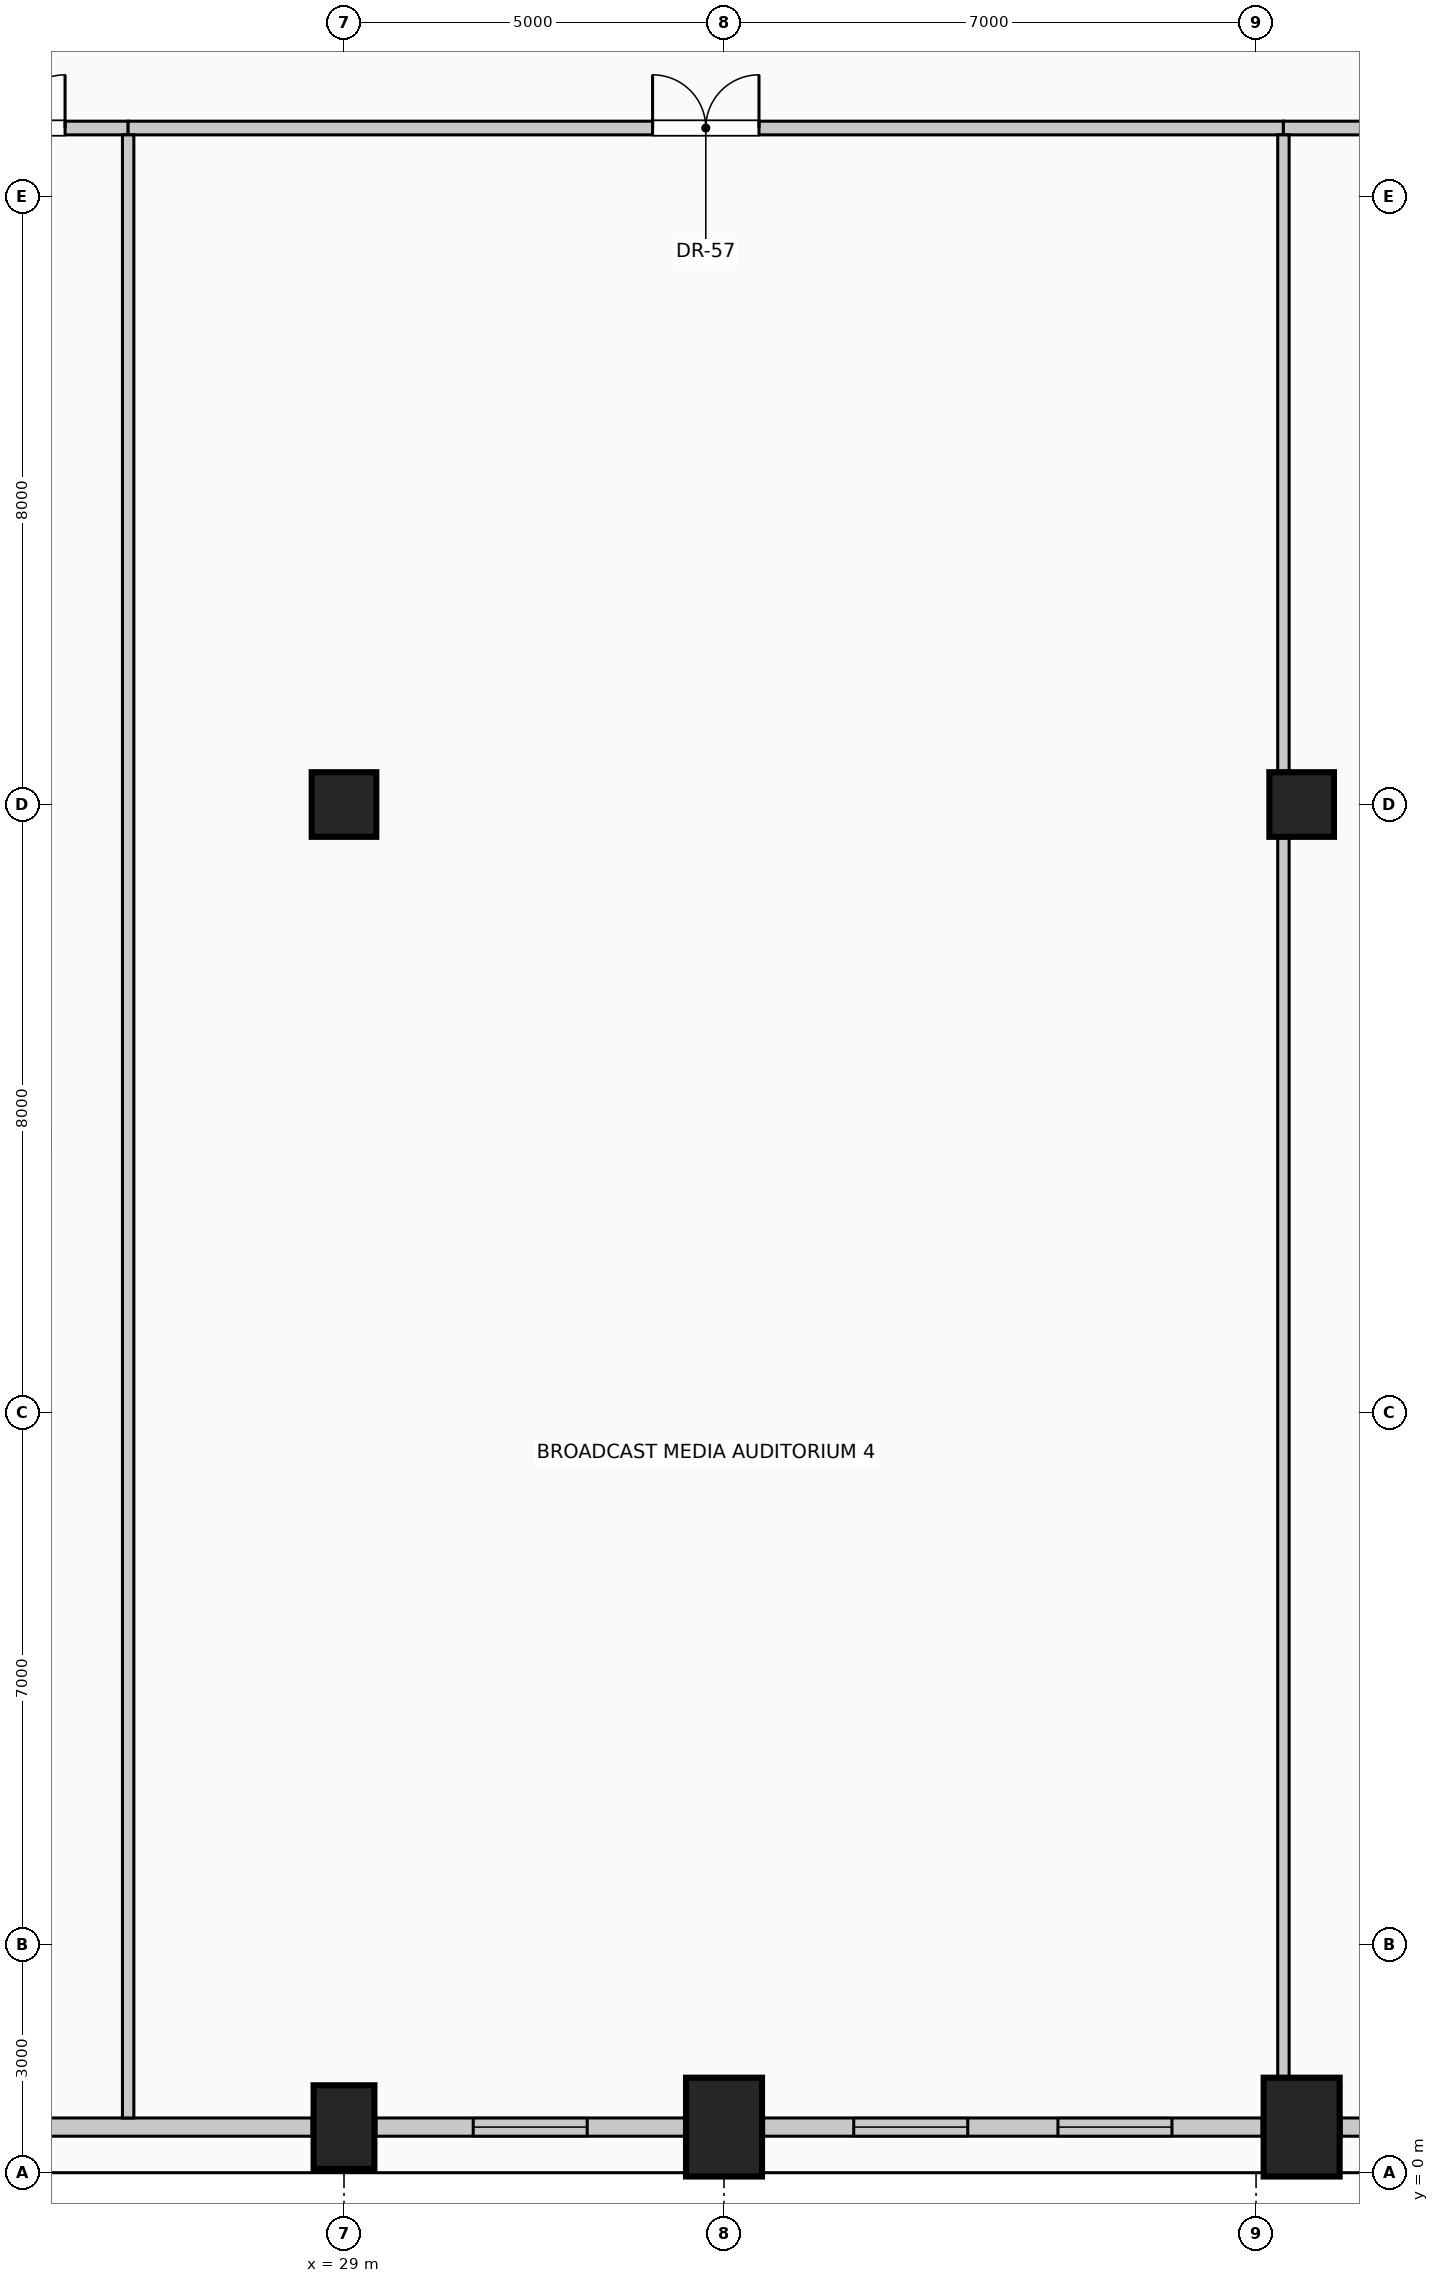
"""IFC4 building model, lengths in metres.
Left out: names, types, materials, properties, quantities, classifications, styles, units other than length and angle.
Written with IfcOpenShell. Run it as: python <this file> out.ifc"""

import sys

from ifc_helpers import new_model, si_unit, direction, frame, frame_2d, origin, origin_2d, place, context, subcontext, project, spatial, rectangle, circle, extrude, element, fill, save


model = new_model("IFC4")
c1 = context("Model", 3, precision=1e-05, world=origin(), true_north=direction((0.0, 1.0)))
c2 = subcontext(c1, "Body", "Model", "MODEL_VIEW")
j1 = project(units=[si_unit("LENGTHUNIT", "METRE"), si_unit("PLANEANGLEUNIT", "RADIAN")], contexts=[c1])
p1 = place(None, origin())
s1 = spatial("IfcSite", under=j1, at=p1, CompositionType="ELEMENT")
p2 = place(p1, origin())
s2 = spatial("IfcBuilding", under=s1, at=p2, CompositionType="ELEMENT")
p3 = place(p2, frame((0.0, 0.0, 170.6)))
s3 = spatial("IfcBuildingStorey", under=s2, at=p3, CompositionType="ELEMENT", Elevation=170.6)
p4 = place(p3, frame((29.0, 0.6, 0.0), z_axis=(0.0, 0.0, 1.0), x_axis=(1.0, 0.0, 0.0)))
e1 = element("IfcColumn", 1, at=p4, inside=s3, PredefinedType="COLUMN", context=c2, shape_type="SweptSolid", body=[
    extrude(rectangle(XDim=0.8, YDim=1.1, at=origin_2d()), origin(), (0.0, 0.0, 1.0), 4.0),
])
for number, where, z_axis, x_axis in (
    (2, (34.0, 0.6, 0.0), (0.0, 0.0, 1.0), (1.0, 0.0, 0.0)),
    (3, (41.6, 0.6, 0.0), (0.0, 0.0, 1.0), (1.0, 0.0, 0.0)),
):
    element("IfcColumn", number, at=place(p3, frame(where, z_axis=z_axis, x_axis=x_axis)), inside=s3, PredefinedType="COLUMN", context=c2, shape_type="SweptSolid", body=[
        extrude(rectangle(XDim=1.0, YDim=1.3, at=origin_2d()), origin(), (0.0, 0.0, 1.0), 4.0),
    ])
for number, where, z_axis, x_axis in (
    (4, (29.0, 18.0, 0.0), (0.0, 0.0, 1.0), (1.0, 0.0, 0.0)),
    (5, (41.6, 18.0, 0.0), (0.0, 0.0, 1.0), (1.0, 0.0, 0.0)),
):
    element("IfcColumn", number, at=place(p3, frame(where, z_axis=z_axis, x_axis=x_axis)), inside=s3, PredefinedType="COLUMN", context=c2, shape_type="SweptSolid", body=[
        extrude(circle(Radius=0.425, at=origin_2d()), origin(), (0.0, 0.0, 1.0), 4.0),
    ])
p5 = place(p3, frame((28.58, 0.6, 0.0), z_axis=(0.0, 0.0, 1.0), x_axis=(-1.0, 0.0, 0.0)))
e6 = element("IfcWall", 6, at=p5, inside=s3, PredefinedType="SOLIDWALL", context=c2, shape_type="SweptSolid", body=[
    extrude(rectangle(XDim=4.06, YDim=0.24, at=frame_2d((2.03, 0.0))), origin(), (0.0, 0.0, 1.0), 2.975),
])
p6 = place(p3, frame((33.48, 0.6, 0.0), z_axis=(0.0, 0.0, 1.0), x_axis=(-1.0, 0.0, 0.0)))
e7 = element("IfcWall", 7, at=p6, inside=s3, PredefinedType="SOLIDWALL", context=c2, shape_type="SweptSolid", body=[
    extrude(rectangle(XDim=4.06, YDim=0.24, at=frame_2d((2.03, 0.0))), origin(), (0.0, 0.0, 1.0), 2.975),
])
p7 = place(p6, frame((1.28, 0.0, 0.42)))
e8 = element("IfcOpeningElement", 8, at=p7, cuts=e7, PredefinedType="OPENING", context=c2, shape_type="SweptSolid", body=[
    extrude(rectangle(XDim=1.5, YDim=2.2, at=frame_2d((0.75, 1.1))), frame((0.0, 0.13, 0.0), z_axis=(0.0, -1.0, 0.0), x_axis=(1.0, 0.0, 0.0)), (0.0, 0.0, 1.0), 0.26),
])
p8 = place(p3, frame((41.08, 0.6, 0.0), z_axis=(0.0, 0.0, 1.0), x_axis=(-1.0, 0.0, 0.0)))
e9 = element("IfcWall", 9, at=p8, inside=s3, PredefinedType="SOLIDWALL", context=c2, shape_type="SweptSolid", body=[
    extrude(rectangle(XDim=6.56, YDim=0.24, at=frame_2d((3.28, 0.0))), origin(), (0.0, 0.0, 1.0), 2.975),
])
p9 = place(p8, frame((1.187, 0.0, 0.42)))
e10 = element("IfcOpeningElement", 10, at=p9, cuts=e9, PredefinedType="OPENING", context=c2, shape_type="SweptSolid", body=[
    extrude(rectangle(XDim=1.5, YDim=2.2, at=frame_2d((0.75, 1.1))), frame((0.0, 0.13, 0.0), z_axis=(0.0, -1.0, 0.0), x_axis=(1.0, 0.0, 0.0)), (0.0, 0.0, 1.0), 0.26),
])
p10 = place(p8, frame((3.873, 0.0, 0.42)))
e11 = element("IfcOpeningElement", 11, at=p10, cuts=e9, PredefinedType="OPENING", context=c2, shape_type="SweptSolid", body=[
    extrude(rectangle(XDim=1.5, YDim=2.2, at=frame_2d((0.75, 1.1))), frame((0.0, 0.13, 0.0), z_axis=(0.0, -1.0, 0.0), x_axis=(1.0, 0.0, 0.0)), (0.0, 0.0, 1.0), 0.26),
])
p11 = place(p3, frame((43.58, 0.6, 0.0), z_axis=(0.0, 0.0, 1.0), x_axis=(-1.0, 0.0, 0.0)))
e12 = element("IfcWall", 12, at=p11, inside=s3, PredefinedType="SOLIDWALL", context=c2, shape_type="SweptSolid", body=[
    extrude(rectangle(XDim=1.46, YDim=0.24, at=frame_2d((0.73, 0.0))), origin(), (0.0, 0.0, 1.0), 2.975),
])
p12 = place(p3, frame((23.1, 26.9, 0.0), z_axis=(0.0, 0.0, 1.0), x_axis=(1.0, 0.0, 0.0)))
e13 = element("IfcWall", 13, at=p12, inside=s3, PredefinedType="PARTITIONING", context=c2, shape_type="SweptSolid", body=[
    extrude(rectangle(XDim=3.06, YDim=0.18, at=frame_2d((1.53, 0.0))), origin(), (0.0, 0.0, 1.0), 3.725),
])
p13 = place(p12, frame((0.83, 0.0, 0.0)))
e14 = element("IfcOpeningElement", 14, at=p13, cuts=e13, PredefinedType="OPENING", context=c2, shape_type="SweptSolid", body=[
    extrude(rectangle(XDim=1.4, YDim=2.2, at=frame_2d((0.7, 1.1))), frame((0.0, 0.1, 0.0), z_axis=(0.0, -1.0, 0.0), x_axis=(1.0, 0.0, 0.0)), (0.0, 0.0, 1.0), 0.2),
])
p14 = place(p3, frame((26.16, 26.9, 0.0), z_axis=(0.0, 0.0, 1.0), x_axis=(1.0, 0.0, 0.0)))
e15 = element("IfcWall", 15, at=p14, inside=s3, PredefinedType="PARTITIONING", context=c2, shape_type="SweptSolid", body=[
    extrude(rectangle(XDim=15.2, YDim=0.18, at=frame_2d((7.6, 0.0))), origin(), (0.0, 0.0, 1.0), 3.725),
])
p15 = place(p14, frame((6.9, 0.0, 0.0)))
e16 = element("IfcOpeningElement", 16, at=p15, cuts=e15, PredefinedType="OPENING", context=c2, shape_type="SweptSolid", body=[
    extrude(rectangle(XDim=1.4, YDim=2.2, at=frame_2d((0.7, 1.1))), frame((0.0, 0.1, 0.0), z_axis=(0.0, -1.0, 0.0), x_axis=(1.0, 0.0, 0.0)), (0.0, 0.0, 1.0), 0.2),
])
p16 = place(p3, frame((41.36, 26.9, 0.0), z_axis=(0.0, 0.0, 1.0), x_axis=(1.0, 0.0, 0.0)))
e17 = element("IfcWall", 17, at=p16, inside=s3, PredefinedType="PARTITIONING", context=c2, shape_type="SweptSolid", body=[
    extrude(rectangle(XDim=8.34, YDim=0.18, at=frame_2d((4.17, 0.0))), origin(), (0.0, 0.0, 1.0), 3.725),
])
p17 = place(p16, frame((3.695, 0.0, 0.0)))
e18 = element("IfcOpeningElement", 18, at=p17, cuts=e17, PredefinedType="OPENING", context=c2, shape_type="SweptSolid", body=[
    extrude(rectangle(XDim=0.95, YDim=2.15, at=frame_2d((0.475, 1.075))), frame((0.0, 0.1, 0.0), z_axis=(0.0, -1.0, 0.0), x_axis=(1.0, 0.0, 0.0)), (0.0, 0.0, 1.0), 0.2),
])
p18 = place(p3, frame((26.16, 0.72, 0.0), z_axis=(0.0, 0.0, 1.0), x_axis=(0.0, 1.0, 0.0)))
e19 = element("IfcWall", 19, at=p18, inside=s3, PredefinedType="PARTITIONING", context=c2, shape_type="SweptSolid", body=[
    extrude(rectangle(XDim=26.09, YDim=0.15, at=frame_2d((13.045, 0.0))), origin(), (0.0, 0.0, 1.0), 3.725),
])
p19 = place(p3, frame((41.36, 1.25, 0.0), z_axis=(0.0, 0.0, 1.0), x_axis=(0.0, 1.0, 0.0)))
e20 = element("IfcWall", 20, at=p19, inside=s3, PredefinedType="PARTITIONING", context=c2, shape_type="SweptSolid", body=[
    extrude(rectangle(XDim=16.325, YDim=0.15, at=frame_2d((8.163, 0.0))), origin(), (0.0, 0.0, 1.0), 3.12),
])
p20 = place(p3, frame((41.36, 18.425, 0.0), z_axis=(0.0, 0.0, 1.0), x_axis=(0.0, 1.0, 0.0)))
e21 = element("IfcWall", 21, at=p20, inside=s3, PredefinedType="PARTITIONING", context=c2, shape_type="SweptSolid", body=[
    extrude(rectangle(XDim=8.385, YDim=0.15, at=frame_2d((4.192, 0.0))), origin(), (0.0, 0.0, 1.0), 3.12),
])
p21 = place(p7, origin())
e22 = element("IfcWindow", 22, at=p21, inside=s3, PartitioningType="SINGLE_PANEL", PredefinedType="WINDOW", context=c2, shape_type="SweptSolid", body=[
    extrude(rectangle(XDim=1.5, YDim=2.2, at=frame_2d((0.75, 1.1))), frame((0.0, 0.03, 0.0), z_axis=(0.0, -1.0, 0.0), x_axis=(1.0, 0.0, 0.0)), (0.0, 0.0, 1.0), 0.06),
])
fill(e8, e22)
p22 = place(p9, origin())
e23 = element("IfcWindow", 23, at=p22, inside=s3, PartitioningType="SINGLE_PANEL", PredefinedType="WINDOW", context=c2, shape_type="SweptSolid", body=[
    extrude(rectangle(XDim=1.5, YDim=2.2, at=frame_2d((0.75, 1.1))), frame((0.0, 0.03, 0.0), z_axis=(0.0, -1.0, 0.0), x_axis=(1.0, 0.0, 0.0)), (0.0, 0.0, 1.0), 0.06),
])
fill(e10, e23)
p23 = place(p10, origin())
e24 = element("IfcWindow", 24, at=p23, inside=s3, PartitioningType="SINGLE_PANEL", PredefinedType="WINDOW", context=c2, shape_type="SweptSolid", body=[
    extrude(rectangle(XDim=1.5, YDim=2.2, at=frame_2d((0.75, 1.1))), frame((0.0, 0.03, 0.0), z_axis=(0.0, -1.0, 0.0), x_axis=(1.0, 0.0, 0.0)), (0.0, 0.0, 1.0), 0.06),
])
fill(e11, e24)
p24 = place(p13, origin())
e25 = element("IfcDoor", 25, at=p24, inside=s3, OperationType="DOUBLE_DOOR_SINGLE_SWING", PredefinedType="DOOR", context=c2, shape_type="SweptSolid", body=[
    extrude(rectangle(XDim=1.4, YDim=2.2, at=frame_2d((0.7, 1.1))), frame((0.0, 0.025, 0.0), z_axis=(0.0, -1.0, 0.0), x_axis=(1.0, 0.0, 0.0)), (0.0, 0.0, 1.0), 0.05),
])
fill(e14, e25)
p25 = place(p15, origin())
e26 = element("IfcDoor", 26, at=p25, inside=s3, OperationType="DOUBLE_DOOR_SINGLE_SWING", PredefinedType="DOOR", context=c2, shape_type="SweptSolid", body=[
    extrude(rectangle(XDim=1.4, YDim=2.2, at=frame_2d((0.7, 1.1))), frame((0.0, 0.025, 0.0), z_axis=(0.0, -1.0, 0.0), x_axis=(1.0, 0.0, 0.0)), (0.0, 0.0, 1.0), 0.05),
])
fill(e16, e26)
save(model, sys.argv[1])
